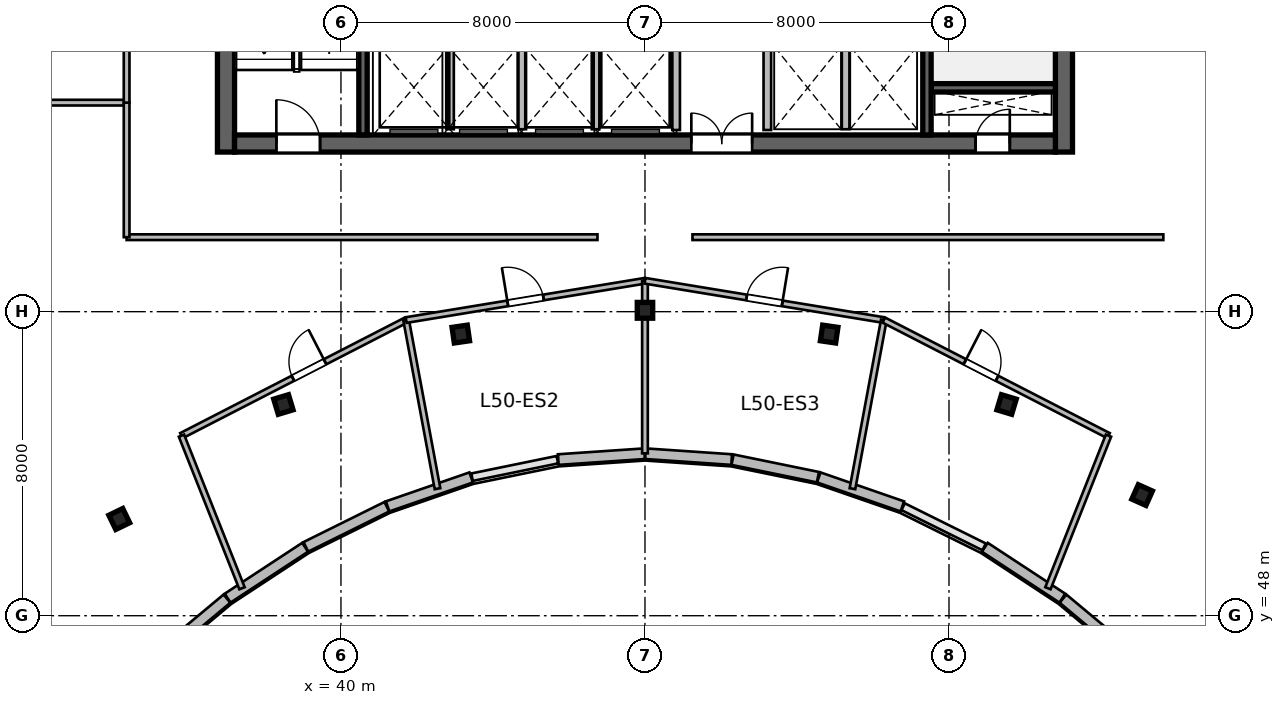
"""IFC4 building model, lengths in metres.
Left out: names, types, materials, properties, quantities, classifications, styles, units other than length and angle.
Written with IfcOpenShell. Run it as: python <this file> out.ifc"""

import sys

from ifc_helpers import new_model, si_unit, direction, frame, frame_2d, origin, origin_2d, place, context, subcontext, project, spatial, rectangle, i_section, extrude, source, transform, mapped, element, fill, save


model = new_model("IFC4")
c1 = context("Model", 3, precision=1e-05, world=origin(), true_north=direction((0.0, 1.0)))
c2 = subcontext(c1, "Body", "Model", "MODEL_VIEW")
j1 = project(units=[si_unit("LENGTHUNIT", "METRE"), si_unit("PLANEANGLEUNIT", "RADIAN")], contexts=[c1])
p1 = place(None, origin())
s1 = spatial("IfcSite", under=j1, at=p1, CompositionType="ELEMENT")
p2 = place(p1, origin())
s2 = spatial("IfcBuilding", under=s1, at=p2, CompositionType="ELEMENT")
p3 = place(p2, frame((0.0, 0.0, 207.9)))
s3 = spatial("IfcBuildingStorey", under=s2, at=p3, CompositionType="ELEMENT", Elevation=207.9)
m1 = source(origin(), c2, "Body", "SweptSolid", [
    extrude(rectangle(XDim=12.0, YDim=0.45, at=frame_2d((6.0, 0.0))), origin(), (0.0, 0.0, 1.0), 3.9),
])
for number, where, z_axis, x_axis in (
    (1, (36.975, 60.2, 0.0), (0.0, 0.0, 1.0), (0.0, 1.0, 0.0)),
    (2, (59.025, 60.2, 0.0), (0.0, 0.0, 1.0), (0.0, 1.0, 0.0)),
):
    element("IfcWall", number, at=place(p3, frame(where, z_axis=z_axis, x_axis=x_axis)), inside=s3, PredefinedType="SHEAR", context=c2, shape_type="MappedRepresentation", body=[
        mapped(m1, transform((0.0, 0.0, 0.0), scale=1.0)),
    ])
m2 = source(origin(), c2, "Body", "SweptSolid", [
    extrude(rectangle(XDim=21.6, YDim=0.45, at=frame_2d((10.8, 0.0))), origin(), (0.0, 0.0, 1.0), 3.9),
])
p4 = place(p3, frame((37.2, 60.425, 0.0), z_axis=(0.0, 0.0, 1.0), x_axis=(1.0, 0.0, 0.0)))
e3 = element("IfcWall", 3, at=p4, inside=s3, PredefinedType="SHEAR", context=c2, shape_type="MappedRepresentation", body=[
    mapped(m2, transform((0.0, 0.0, 0.0), scale=1.0)),
])
p5 = place(p4, frame((1.1, 0.0, 0.0)))
e4 = element("IfcOpeningElement", 4, at=p5, cuts=e3, PredefinedType="OPENING", context=c2, shape_type="SweptSolid", body=[
    extrude(rectangle(XDim=1.15, YDim=2.15, at=frame_2d((0.575, 1.075))), frame((0.0, 0.235, 0.0), z_axis=(0.0, -1.0, 0.0), x_axis=(1.0, 0.0, 0.0)), (0.0, 0.0, 1.0), 0.47),
])
p6 = place(p4, frame((19.5, 0.0, 0.0)))
e5 = element("IfcOpeningElement", 5, at=p6, cuts=e3, PredefinedType="OPENING", context=c2, shape_type="SweptSolid", body=[
    extrude(rectangle(XDim=0.9, YDim=2.1, at=frame_2d((0.45, 1.05))), frame((0.0, 0.235, 0.0), z_axis=(0.0, -1.0, 0.0), x_axis=(1.0, 0.0, 0.0)), (0.0, 0.0, 1.0), 0.47),
])
p7 = place(p4, frame((12.02, 0.0, 0.0)))
e6 = element("IfcOpeningElement", 6, at=p7, cuts=e3, PredefinedType="OPENING", context=c2, shape_type="SweptSolid", body=[
    extrude(rectangle(XDim=1.6, YDim=2.15, at=frame_2d((0.8, 1.075))), frame((0.0, 0.235, 0.0), z_axis=(0.0, -1.0, 0.0), x_axis=(1.0, 0.0, 0.0)), (0.0, 0.0, 1.0), 0.47),
])
m3 = source(origin(), c2, "Body", "SweptSolid", [
    extrude(rectangle(XDim=3.27, YDim=0.22, at=frame_2d((1.635, 0.0))), origin(), (0.0, 0.0, 1.0), 3.9),
])
p8 = place(p3, frame((55.53, 61.89, 0.0), z_axis=(0.0, 0.0, 1.0), x_axis=(1.0, 0.0, 0.0)))
e7 = element("IfcWall", 7, at=p8, inside=s3, PredefinedType="SHEAR", context=c2, shape_type="MappedRepresentation", body=[
    mapped(m3, transform((0.0, 0.0, 0.0), scale=1.0)),
])
m4 = source(origin(), c2, "Body", "SweptSolid", [
    extrude(rectangle(XDim=11.1, YDim=0.22, at=frame_2d((5.55, 0.0))), origin(), (0.0, 0.0, 1.0), 3.9),
])
p9 = place(p3, frame((40.58, 60.65, 0.0), z_axis=(0.0, 0.0, 1.0), x_axis=(0.0, 1.0, 0.0)))
e8 = element("IfcWall", 8, at=p9, inside=s3, PredefinedType="SHEAR", context=c2, shape_type="MappedRepresentation", body=[
    mapped(m4, transform((0.0, 0.0, 0.0), scale=1.0)),
])
p10 = place(p3, frame((55.42, 60.65, 0.0), z_axis=(0.0, 0.0, 1.0), x_axis=(0.0, 1.0, 0.0)))
e9 = element("IfcWall", 9, at=p10, inside=s3, PredefinedType="SHEAR", context=c2, shape_type="MappedRepresentation", body=[
    mapped(m4, transform((0.0, 0.0, 0.0), scale=1.0)),
])
p11 = place(p10, frame((9.595, 0.0, 0.0)))
e10 = element("IfcOpeningElement", 10, at=p11, cuts=e9, PredefinedType="OPENING", context=c2, shape_type="SweptSolid", body=[
    extrude(rectangle(XDim=1.15, YDim=2.15, at=frame_2d((0.575, 1.075))), frame((0.0, 0.12, 0.0), z_axis=(0.0, -1.0, 0.0), x_axis=(1.0, 0.0, 0.0)), (0.0, 0.0, 1.0), 0.24),
])
m5 = source(origin(), c2, "Body", "SweptSolid", [
    extrude(i_section(OverallWidth=0.406, OverallDepth=0.416, WebThickness=0.03, FlangeThickness=0.048, at=origin_2d()), origin(), (0.0, 0.0, 1.0), 3.9),
])
for number, where, z_axis, x_axis in (
    (11, (34.166, 50.545, 0.0), (0.0, 0.0, 1.0), (-0.436, 0.9, 0.0)),
    (12, (38.485, 53.558, 0.0), (0.0, 0.0, 1.0), (-0.289, 0.957, 0.0)),
    (13, (43.154, 55.411, 0.0), (0.0, 0.0, 1.0), (-0.143, 0.99, 0.0)),
    (14, (48.0, 56.036, 0.0), (0.0, 0.0, 1.0), (0.0, 1.0, 0.0)),
    (15, (52.846, 55.411, 0.0), (0.0, 0.0, 1.0), (0.143, 0.99, 0.0)),
    (16, (57.515, 53.558, 0.0), (0.0, 0.0, 1.0), (0.289, 0.957, 0.0)),
    (17, (61.082, 51.175, 0.0), (0.0, 0.0, 1.0), (0.409, 0.912, 0.0)),
):
    element("IfcColumn", number, at=place(p3, frame(where, z_axis=z_axis, x_axis=x_axis)), inside=s3, PredefinedType="COLUMN", context=c2, shape_type="MappedRepresentation", body=[
        mapped(m5, transform((0.0, 0.0, 0.0), scale=1.0)),
    ])
m6 = source(origin(), c2, "Body", "SweptSolid", [
    extrude(rectangle(XDim=2.511, YDim=0.28, at=frame_2d((1.256, 0.0))), origin(), (0.0, 0.0, 1.0), 3.64),
])
p12 = place(p3, frame((60.928, 46.841, 0.0), z_axis=(0.0, 0.0, 1.0), x_axis=(-0.767910416122, 0.640557251782, 0.0)))
e18 = element("IfcWall", 18, at=p12, inside=s3, PredefinedType="SOLIDWALL", context=c2, shape_type="MappedRepresentation", body=[
    mapped(m6, transform((0.0, 0.0, 0.0), scale=1.0)),
])
m7 = source(origin(), c2, "Body", "SweptSolid", [
    extrude(rectangle(XDim=2.44, YDim=0.28, at=frame_2d((1.22, 0.0))), origin(), (0.0, 0.0, 1.0), 3.64),
])
p13 = place(p3, frame((58.983, 48.462, 0.0), z_axis=(0.0, 0.0, 1.0), x_axis=(-0.83598480459, 0.548752591333, 0.0)))
e19 = element("IfcWall", 19, at=p13, inside=s3, PredefinedType="SOLIDWALL", context=c2, shape_type="MappedRepresentation", body=[
    mapped(m7, transform((0.0, 0.0, 0.0), scale=1.0)),
])
m8 = source(origin(), c2, "Body", "SweptSolid", [
    extrude(rectangle(XDim=2.328, YDim=0.28, at=frame_2d((1.164, 0.0))), origin(), (0.0, 0.0, 1.0), 3.64),
])
p14 = place(p3, frame((54.772, 50.876, 0.0), z_axis=(0.0, 0.0, 1.0), x_axis=(-0.944872545641, 0.32743834915, 0.0)))
e20 = element("IfcWall", 20, at=p14, inside=s3, PredefinedType="SOLIDWALL", context=c2, shape_type="MappedRepresentation", body=[
    mapped(m8, transform((0.0, 0.0, 0.0), scale=1.0)),
])
m9 = source(origin(), c2, "Body", "SweptSolid", [
    extrude(rectangle(XDim=2.292, YDim=0.28, at=frame_2d((1.146, 0.0))), origin(), (0.0, 0.0, 1.0), 3.64),
])
p15 = place(p3, frame((52.55, 51.645, 0.0), z_axis=(0.0, 0.0, 1.0), x_axis=(-0.979635482689, 0.200784264963, 0.0)))
e21 = element("IfcWall", 21, at=p15, inside=s3, PredefinedType="SOLIDWALL", context=c2, shape_type="MappedRepresentation", body=[
    mapped(m9, transform((0.0, 0.0, 0.0), scale=1.0)),
])
m10 = source(origin(), c2, "Body", "SweptSolid", [
    extrude(rectangle(XDim=2.274, YDim=0.28, at=frame_2d((1.137, 0.0))), origin(), (0.0, 0.0, 1.0), 3.64),
])
for number, where, z_axis, x_axis in (
    (22, (50.281, 52.109, 0.0), (0.0, 0.0, 1.0), (-0.998, 0.068, 0.0)),
    (23, (47.988, 52.263, 0.0), (0.0, 0.0, 1.0), (-0.998, -0.068, 0.0)),
):
    element("IfcWall", number, at=place(p3, frame(where, z_axis=z_axis, x_axis=x_axis)), inside=s3, PredefinedType="SOLIDWALL", context=c2, shape_type="MappedRepresentation", body=[
        mapped(m10, transform((0.0, 0.0, 0.0), scale=1.0)),
    ])
p16 = place(p3, frame((43.427, 51.639, 0.0), z_axis=(0.0, 0.0, 1.0), x_axis=(-0.944872545641, -0.32743834915, 0.0)))
e24 = element("IfcWall", 24, at=p16, inside=s3, PredefinedType="SOLIDWALL", context=c2, shape_type="MappedRepresentation", body=[
    mapped(m8, transform((0.0, 0.0, 0.0), scale=1.0)),
])
m11 = source(origin(), c2, "Body", "SweptSolid", [
    extrude(rectangle(XDim=2.378, YDim=0.28, at=frame_2d((1.189, 0.0))), origin(), (0.0, 0.0, 1.0), 3.64),
])
p17 = place(p3, frame((41.207, 50.868, 0.0), z_axis=(0.0, 0.0, 1.0), x_axis=(-0.895941616831, -0.444171835252, 0.0)))
e25 = element("IfcWall", 25, at=p17, inside=s3, PredefinedType="SOLIDWALL", context=c2, shape_type="MappedRepresentation", body=[
    mapped(m11, transform((0.0, 0.0, 0.0), scale=1.0)),
])
p18 = place(p3, frame((39.057, 49.801, 0.0), z_axis=(0.0, 0.0, 1.0), x_axis=(-0.83598480459, -0.548752591333, 0.0)))
e26 = element("IfcWall", 26, at=p18, inside=s3, PredefinedType="SOLIDWALL", context=c2, shape_type="MappedRepresentation", body=[
    mapped(m7, transform((0.0, 0.0, 0.0), scale=1.0)),
])
p19 = place(p3, frame((37.001, 48.449, 0.0), z_axis=(0.0, 0.0, 1.0), x_axis=(-0.767910416122, -0.640557251782, 0.0)))
e27 = element("IfcWall", 27, at=p19, inside=s3, PredefinedType="SOLIDWALL", context=c2, shape_type="MappedRepresentation", body=[
    mapped(m6, transform((0.0, 0.0, 0.0), scale=1.0)),
])
m12 = source(origin(), c2, "Body", "SweptSolid", [
    extrude(rectangle(XDim=2.24, YDim=0.2, at=frame_2d((1.12, 0.0))), origin(), (0.0, 0.0, 1.0), 3.64),
])
for number, where, z_axis, x_axis in (
    (28, (48.82, 60.78, 0.0), (0.0, 0.0, 1.0), (0.0, 1.0, 0.0)),
    (29, (51.22, 60.78, 0.0), (0.0, 0.0, 1.0), (0.0, 1.0, 0.0)),
):
    element("IfcWall", number, at=place(p3, frame(where, z_axis=z_axis, x_axis=x_axis)), inside=s3, PredefinedType="SOLIDWALL", context=c2, shape_type="MappedRepresentation", body=[
        mapped(m12, transform((0.0, 0.0, 0.0), scale=1.0)),
    ])
m13 = source(origin(), c2, "Body", "SweptSolid", [
    extrude(rectangle(XDim=2.2, YDim=0.2, at=frame_2d((1.1, 0.0))), origin(), (0.0, 0.0, 1.0), 3.64),
])
for number, where, z_axis, x_axis in (
    (30, (42.87, 60.8, 0.0), (0.0, 0.0, 1.0), (0.0, 1.0, 0.0)),
    (31, (44.77, 60.8, 0.0), (0.0, 0.0, 1.0), (0.0, 1.0, 0.0)),
    (32, (46.7, 60.8, 0.0), (0.0, 0.0, 1.0), (0.0, 1.0, 0.0)),
    (33, (53.28, 60.8, 0.0), (0.0, 0.0, 1.0), (0.0, 1.0, 0.0)),
):
    element("IfcWall", number, at=place(p3, frame(where, z_axis=z_axis, x_axis=x_axis)), inside=s3, PredefinedType="SOLIDWALL", context=c2, shape_type="MappedRepresentation", body=[
        mapped(m13, transform((0.0, 0.0, 0.0), scale=1.0)),
    ])
m14 = source(origin(), c2, "Body", "SweptSolid", [
    extrude(rectangle(XDim=6.648, YDim=0.15, at=frame_2d((3.324, 0.0))), origin(), (0.0, 0.0, 1.0), 3.64),
])
p20 = place(p3, frame((35.803, 52.738, 0.0), z_axis=(0.0, 0.0, 1.0), x_axis=(0.889264330224, 0.457393649925, 0.0)))
e34 = element("IfcWall", 34, at=p20, inside=s3, PredefinedType="PARTITIONING", context=c2, shape_type="MappedRepresentation", body=[
    mapped(m14, transform((0.0, 0.0, 0.0), scale=1.0)),
])
p21 = place(p20, frame((3.299, 0.0, 0.0)))
e35 = element("IfcOpeningElement", 35, at=p21, cuts=e34, PredefinedType="OPENING", context=c2, shape_type="SweptSolid", body=[
    extrude(rectangle(XDim=0.95, YDim=2.1, at=frame_2d((0.475, 1.05))), frame((0.0, 0.085, 0.0), z_axis=(0.0, -1.0, 0.0), x_axis=(1.0, 0.0, 0.0)), (0.0, 0.0, 1.0), 0.17),
])
m15 = source(origin(), c2, "Body", "SweptSolid", [
    extrude(rectangle(XDim=4.32, YDim=0.15, at=frame_2d((2.16, 0.0))), origin(), (0.0, 0.0, 1.0), 3.64),
])
p22 = place(p3, frame((37.396, 48.723, 0.0), z_axis=(0.0, 0.0, 1.0), x_axis=(-0.368846295269, 0.929490403644, 0.0)))
e36 = element("IfcWall", 36, at=p22, inside=s3, PredefinedType="PARTITIONING", context=c2, shape_type="MappedRepresentation", body=[
    mapped(m15, transform((0.0, 0.0, 0.0), scale=1.0)),
])
m16 = source(origin(), c2, "Body", "SweptSolid", [
    extrude(rectangle(XDim=4.513, YDim=0.15, at=frame_2d((2.257, 0.0))), origin(), (0.0, 0.0, 1.0), 3.64),
])
p23 = place(p3, frame((42.541, 51.342, 0.0), z_axis=(0.0, 0.0, 1.0), x_axis=(-0.182949257828, 0.983122357115, 0.0)))
e37 = element("IfcWall", 37, at=p23, inside=s3, PredefinedType="PARTITIONING", context=c2, shape_type="MappedRepresentation", body=[
    mapped(m16, transform((0.0, 0.0, 0.0), scale=1.0)),
])
m17 = source(origin(), c2, "Body", "SweptSolid", [
    extrude(rectangle(XDim=6.37, YDim=0.15, at=frame_2d((3.185, 0.0))), origin(), (0.0, 0.0, 1.0), 3.64),
])
p24 = place(p3, frame((41.715, 55.779, 0.0), z_axis=(0.0, 0.0, 1.0), x_axis=(0.986731594983, 0.162359968783, 0.0)))
e38 = element("IfcWall", 38, at=p24, inside=s3, PredefinedType="PARTITIONING", context=c2, shape_type="MappedRepresentation", body=[
    mapped(m17, transform((0.0, 0.0, 0.0), scale=1.0)),
])
p25 = place(p24, frame((2.71, 0.0, 0.0)))
e39 = element("IfcOpeningElement", 39, at=p25, cuts=e38, PredefinedType="OPENING", context=c2, shape_type="SweptSolid", body=[
    extrude(rectangle(XDim=0.95, YDim=2.1, at=frame_2d((0.475, 1.05))), frame((0.0, 0.085, 0.0), z_axis=(0.0, -1.0, 0.0), x_axis=(1.0, 0.0, 0.0)), (0.0, 0.0, 1.0), 0.17),
])
m18 = source(origin(), c2, "Body", "SweptSolid", [
    extrude(rectangle(XDim=4.541, YDim=0.15, at=frame_2d((2.27, 0.0))), origin(), (0.0, 0.0, 1.0), 3.085),
])
p26 = place(p3, frame((48.0, 52.273, 0.0), z_axis=(0.0, 0.0, 1.0), x_axis=(0.0, 1.0, 0.0)))
e40 = element("IfcWall", 40, at=p26, inside=s3, PredefinedType="PARTITIONING", context=c2, shape_type="MappedRepresentation", body=[
    mapped(m18, transform((0.0, 0.0, 0.0), scale=1.0)),
])
p27 = place(p3, frame((48.0, 56.813, 0.0), z_axis=(0.0, 0.0, 1.0), x_axis=(0.986731594983, -0.162359968783, 0.0)))
e41 = element("IfcWall", 41, at=p27, inside=s3, PredefinedType="PARTITIONING", context=c2, shape_type="MappedRepresentation", body=[
    mapped(m17, transform((0.0, 0.0, 0.0), scale=1.0)),
])
p28 = place(p27, frame((2.71, 0.0, 0.0)))
e42 = element("IfcOpeningElement", 42, at=p28, cuts=e41, PredefinedType="OPENING", context=c2, shape_type="SweptSolid", body=[
    extrude(rectangle(XDim=0.95, YDim=2.1, at=frame_2d((0.475, 1.05))), frame((0.0, 0.085, 0.0), z_axis=(0.0, -1.0, 0.0), x_axis=(1.0, 0.0, 0.0)), (0.0, 0.0, 1.0), 0.17),
])
p29 = place(p3, frame((53.459, 51.342, 0.0), z_axis=(0.0, 0.0, 1.0), x_axis=(0.182949257828, 0.983122357115, 0.0)))
e43 = element("IfcWall", 43, at=p29, inside=s3, PredefinedType="PARTITIONING", context=c2, shape_type="MappedRepresentation", body=[
    mapped(m16, transform((0.0, 0.0, 0.0), scale=1.0)),
])
p30 = place(p3, frame((54.285, 55.779, 0.0), z_axis=(0.0, 0.0, 1.0), x_axis=(0.889264330224, -0.457393649925, 0.0)))
e44 = element("IfcWall", 44, at=p30, inside=s3, PredefinedType="PARTITIONING", context=c2, shape_type="MappedRepresentation", body=[
    mapped(m14, transform((0.0, 0.0, 0.0), scale=1.0)),
])
p31 = place(p30, frame((2.399, 0.0, 0.0)))
e45 = element("IfcOpeningElement", 45, at=p31, cuts=e44, PredefinedType="OPENING", context=c2, shape_type="SweptSolid", body=[
    extrude(rectangle(XDim=0.95, YDim=2.1, at=frame_2d((0.475, 1.05))), frame((0.0, 0.085, 0.0), z_axis=(0.0, -1.0, 0.0), x_axis=(1.0, 0.0, 0.0)), (0.0, 0.0, 1.0), 0.17),
])
p32 = place(p3, frame((58.604, 48.723, 0.0), z_axis=(0.0, 0.0, 1.0), x_axis=(0.368846295269, 0.929490403644, 0.0)))
e46 = element("IfcWall", 46, at=p32, inside=s3, PredefinedType="PARTITIONING", context=c2, shape_type="MappedRepresentation", body=[
    mapped(m15, transform((0.0, 0.0, 0.0), scale=1.0)),
])
m19 = source(origin(), c2, "Body", "SweptSolid", [
    extrude(rectangle(XDim=12.39, YDim=0.15, at=frame_2d((6.195, 0.0))), origin(), (0.0, 0.0, 1.0), 3.64),
])
for number, where, z_axis, x_axis in (
    (47, (34.36, 57.96, 0.0), (0.0, 0.0, 1.0), (1.0, 0.0, 0.0)),
    (48, (49.25, 57.96, 0.0), (0.0, 0.0, 1.0), (1.0, 0.0, 0.0)),
):
    element("IfcWall", number, at=place(p3, frame(where, z_axis=z_axis, x_axis=x_axis)), inside=s3, PredefinedType="PARTITIONING", context=c2, shape_type="MappedRepresentation", body=[
        mapped(m19, transform((0.0, 0.0, 0.0), scale=1.0)),
    ])
m20 = source(origin(), c2, "Body", "SweptSolid", [
    extrude(rectangle(XDim=18.15, YDim=0.15, at=frame_2d((9.075, 0.0))), origin(), (0.0, 0.0, 1.0), 3.64),
])
p33 = place(p3, frame((16.21, 61.5, 0.0), z_axis=(0.0, 0.0, 1.0), x_axis=(1.0, 0.0, 0.0)))
e49 = element("IfcWall", 49, at=p33, inside=s3, PredefinedType="PARTITIONING", context=c2, shape_type="MappedRepresentation", body=[
    mapped(m20, transform((0.0, 0.0, 0.0), scale=1.0)),
])
m21 = source(origin(), c2, "Body", "SweptSolid", [
    extrude(rectangle(XDim=3.54, YDim=0.15, at=frame_2d((1.77, 0.0))), origin(), (0.0, 0.0, 1.0), 3.64),
])
p34 = place(p3, frame((34.36, 57.96, 0.0), z_axis=(0.0, 0.0, 1.0), x_axis=(0.0, 1.0, 0.0)))
e50 = element("IfcWall", 50, at=p34, inside=s3, PredefinedType="PARTITIONING", context=c2, shape_type="MappedRepresentation", body=[
    mapped(m21, transform((0.0, 0.0, 0.0), scale=1.0)),
])
m22 = source(origin(), c2, "Body", "SweptSolid", [
    extrude(rectangle(XDim=4.7, YDim=0.15, at=frame_2d((2.35, 0.0))), origin(), (0.0, 0.0, 1.0), 3.64),
])
p35 = place(p3, frame((34.36, 61.5, 0.0), z_axis=(0.0, 0.0, 1.0), x_axis=(0.0, 1.0, 0.0)))
e51 = element("IfcWall", 51, at=p35, inside=s3, PredefinedType="PARTITIONING", context=c2, shape_type="MappedRepresentation", body=[
    mapped(m22, transform((0.0, 0.0, 0.0), scale=1.0)),
])
p36 = place(p35, frame((1.875, 0.0, 0.0)))
e52 = element("IfcOpeningElement", 52, at=p36, cuts=e51, PredefinedType="OPENING", context=c2, shape_type="SweptSolid", body=[
    extrude(rectangle(XDim=0.95, YDim=2.1, at=frame_2d((0.475, 1.05))), frame((0.0, 0.085, 0.0), z_axis=(0.0, -1.0, 0.0), x_axis=(1.0, 0.0, 0.0)), (0.0, 0.0, 1.0), 0.17),
])
m23 = source(origin(), c2, "Body", "SweptSolid", [
    extrude(rectangle(XDim=1.15, YDim=2.15, at=frame_2d((0.575, 1.075))), frame((0.0, 0.025, 0.0), z_axis=(0.0, -1.0, 0.0), x_axis=(1.0, 0.0, 0.0)), (0.0, 0.0, 1.0), 0.05),
])
p37 = place(p5, origin())
e53 = element("IfcDoor", 53, at=p37, inside=s3, OperationType="SINGLE_SWING_LEFT", PredefinedType="DOOR", context=c2, shape_type="MappedRepresentation", body=[
    mapped(m23, transform((0.0, 0.0, 0.0), scale=1.0)),
])
fill(e4, e53)
m24 = source(origin(), c2, "Body", "SweptSolid", [
    extrude(rectangle(XDim=0.9, YDim=2.1, at=frame_2d((0.45, 1.05))), frame((0.0, 0.025, 0.0), z_axis=(0.0, -1.0, 0.0), x_axis=(1.0, 0.0, 0.0)), (0.0, 0.0, 1.0), 0.05),
])
p38 = place(p6, origin())
e54 = element("IfcDoor", 54, at=p38, inside=s3, OperationType="SINGLE_SWING_RIGHT", PredefinedType="DOOR", context=c2, shape_type="MappedRepresentation", body=[
    mapped(m24, transform((0.0, 0.0, 0.0), scale=1.0)),
])
fill(e5, e54)
m25 = source(origin(), c2, "Body", "SweptSolid", [
    extrude(rectangle(XDim=1.6, YDim=2.15, at=frame_2d((0.8, 1.075))), frame((0.0, 0.025, 0.0), z_axis=(0.0, -1.0, 0.0), x_axis=(1.0, 0.0, 0.0)), (0.0, 0.0, 1.0), 0.05),
])
p39 = place(p7, origin())
e55 = element("IfcDoor", 55, at=p39, inside=s3, OperationType="DOUBLE_DOOR_SINGLE_SWING", PredefinedType="DOOR", context=c2, shape_type="MappedRepresentation", body=[
    mapped(m25, transform((0.0, 0.0, 0.0), scale=1.0)),
])
fill(e6, e55)
m26 = source(origin(), c2, "Body", "SweptSolid", [
    extrude(rectangle(XDim=0.95, YDim=2.1, at=frame_2d((0.475, 1.05))), frame((0.0, 0.025, 0.0), z_axis=(0.0, -1.0, 0.0), x_axis=(1.0, 0.0, 0.0)), (0.0, 0.0, 1.0), 0.05),
])
p40 = place(p21, origin())
e56 = element("IfcDoor", 56, at=p40, inside=s3, OperationType="SINGLE_SWING_RIGHT", PredefinedType="DOOR", context=c2, shape_type="MappedRepresentation", body=[
    mapped(m26, transform((0.0, 0.0, 0.0), scale=1.0)),
])
fill(e35, e56)
p41 = place(p25, origin())
e57 = element("IfcDoor", 57, at=p41, inside=s3, OperationType="SINGLE_SWING_LEFT", PredefinedType="DOOR", context=c2, shape_type="MappedRepresentation", body=[
    mapped(m26, transform((0.0, 0.0, 0.0), scale=1.0)),
])
fill(e39, e57)
p42 = place(p28, origin())
e58 = element("IfcDoor", 58, at=p42, inside=s3, OperationType="SINGLE_SWING_RIGHT", PredefinedType="DOOR", context=c2, shape_type="MappedRepresentation", body=[
    mapped(m26, transform((0.0, 0.0, 0.0), scale=1.0)),
])
fill(e42, e58)
p43 = place(p31, origin())
e59 = element("IfcDoor", 59, at=p43, inside=s3, OperationType="SINGLE_SWING_LEFT", PredefinedType="DOOR", context=c2, shape_type="MappedRepresentation", body=[
    mapped(m26, transform((0.0, 0.0, 0.0), scale=1.0)),
])
fill(e45, e59)
save(model, sys.argv[1])
